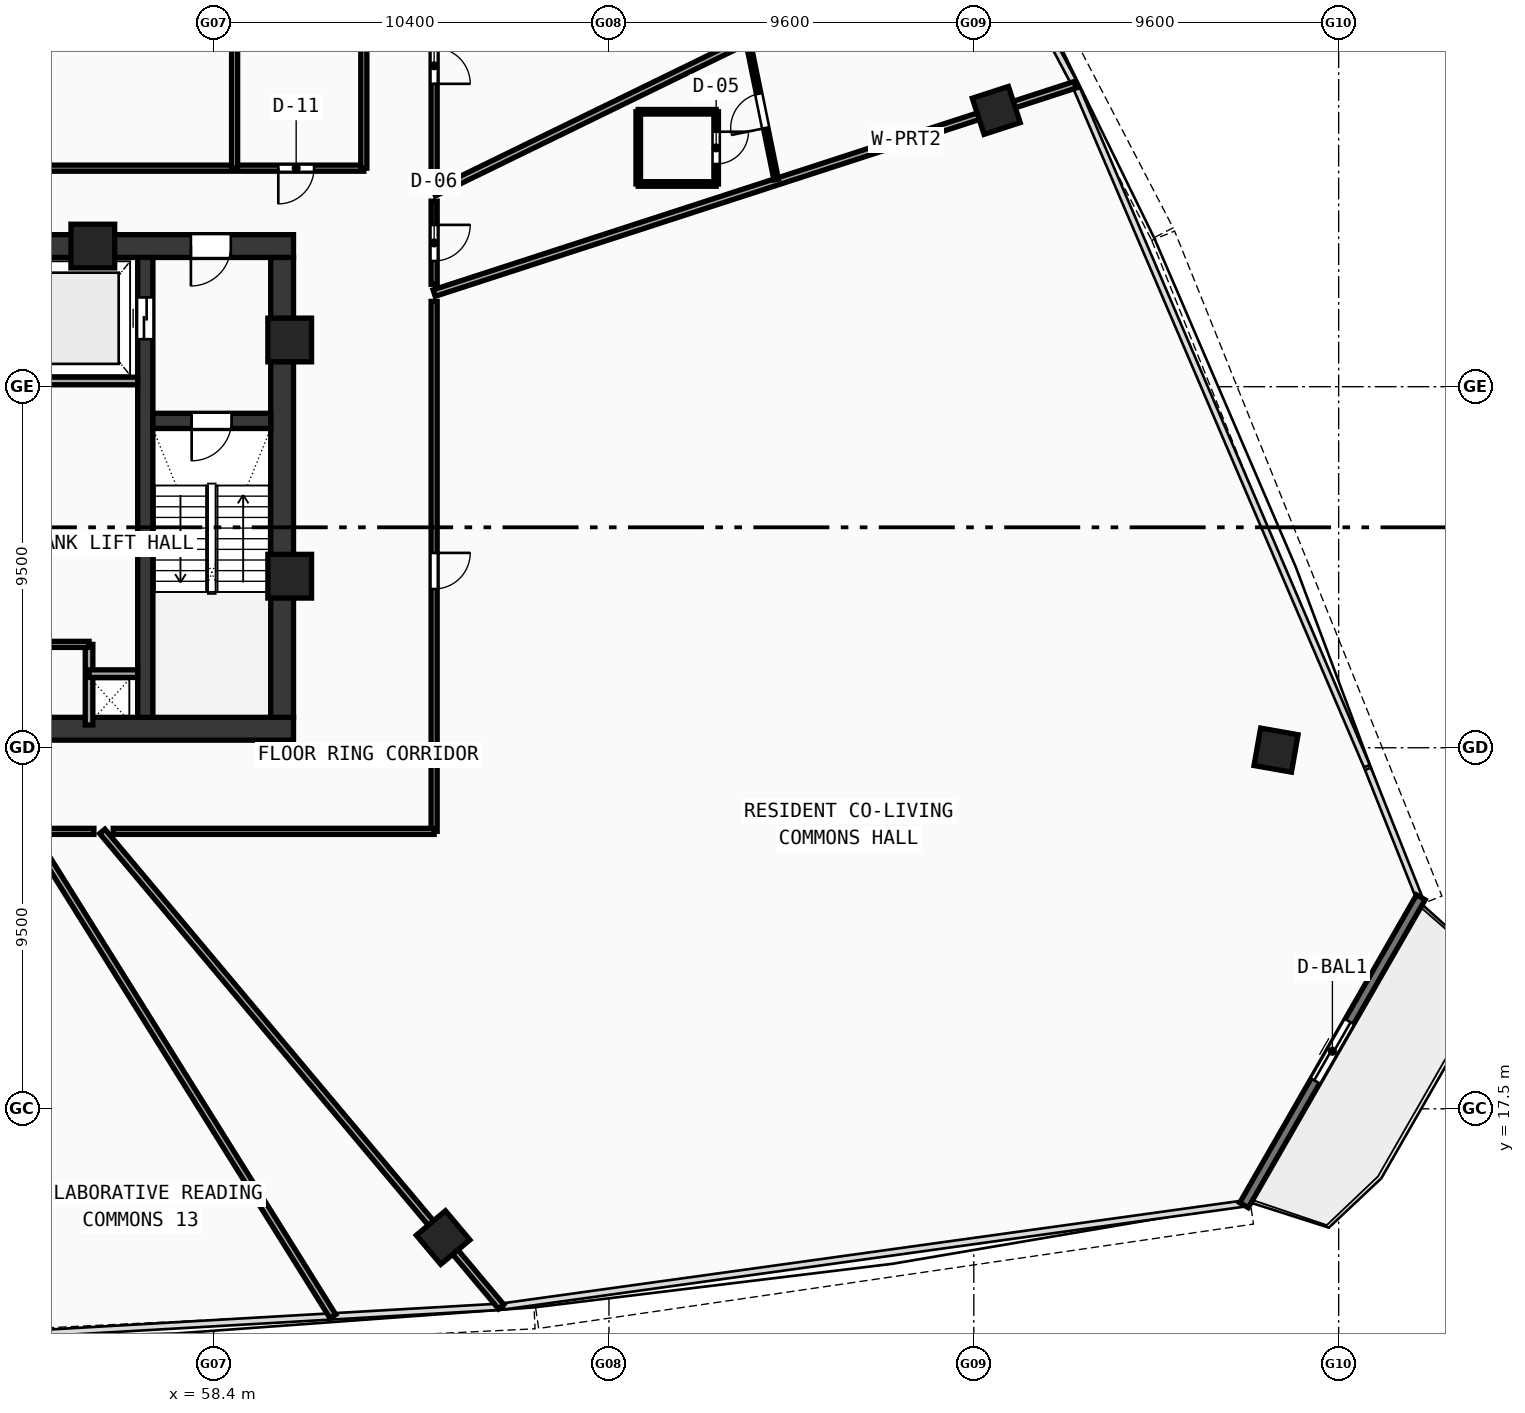
"""IFC4 building model, lengths in metres.
Left out: names, types, materials, properties, quantities, classifications, styles, units other than length and angle.
Written with IfcOpenShell. Run it as: python <this file> out.ifc"""

import sys

from ifc_helpers import new_model, si_unit, direction, frame, frame_2d, origin, origin_with_axes, origin_2d, place, context, subcontext, project, spatial, rectangle, hollow_rectangle, extrude, source, transform, mapped, element, fill, save


model = new_model("IFC4")
c1 = context("Model", 3, precision=1e-05, world=origin(), true_north=direction((0.0, 1.0)))
c2 = subcontext(c1, "Body", "Model", "MODEL_VIEW")
j1 = project(units=[si_unit("LENGTHUNIT", "METRE"), si_unit("PLANEANGLEUNIT", "RADIAN")], contexts=[c1])
p1 = place(None, origin())
s1 = spatial("IfcSite", under=j1, at=p1, CompositionType="ELEMENT")
p2 = place(p1, origin())
s2 = spatial("IfcBuilding", under=s1, at=p2, CompositionType="ELEMENT")
p3 = place(p2, frame((0.0, 0.0, 81.18)))
s3 = spatial("IfcBuildingStorey", under=s2, at=p3, CompositionType="ELEMENT", Elevation=81.18)
p4 = place(p3, frame((35.5, 27.5, 0.0), z_axis=(0.0, 0.0, 1.0), x_axis=(1.0, 0.0, 0.0)))
e1 = element("IfcWall", 1, at=p4, inside=s3, PredefinedType="SHEAR", context=c2, shape_type="SweptSolid", body=[
    extrude(rectangle(XDim=25.0, YDim=0.6, at=frame_2d((12.5, 0.0))), origin(), (0.0, 0.0, 1.0), 3.54),
])
p5 = place(p3, frame((49.2, 40.2, 0.0), z_axis=(0.0, 0.0, 1.0), x_axis=(1.0, 0.0, 0.0)))
e2 = element("IfcWall", 2, at=p5, inside=s3, PredefinedType="SHEAR", context=c2, shape_type="SweptSolid", body=[
    extrude(rectangle(XDim=11.3, YDim=0.6, at=frame_2d((5.65, 0.0))), origin(), (0.0, 0.0, 1.0), 3.54),
])
p6 = place(p5, frame((8.6, 0.0, 0.0)))
e3 = element("IfcOpeningElement", 3, at=p6, cuts=e2, PredefinedType="OPENING", context=c2, shape_type="SweptSolid", body=[
    extrude(rectangle(XDim=1.05, YDim=2.1, at=frame_2d((0.525, 1.05))), frame((0.0, 0.31, 0.0), z_axis=(0.0, -1.0, 0.0), x_axis=(1.0, 0.0, 0.0)), (0.0, 0.0, 1.0), 0.62),
])
p7 = place(p3, frame((60.2, 27.8, 0.0), z_axis=(0.0, 0.0, 1.0), x_axis=(0.0, 1.0, 0.0)))
e4 = element("IfcWall", 4, at=p7, inside=s3, PredefinedType="SHEAR", context=c2, shape_type="SweptSolid", body=[
    extrude(rectangle(XDim=12.1, YDim=0.6, at=frame_2d((6.05, 0.0))), origin(), (0.0, 0.0, 1.0), 3.54),
])
p8 = place(p3, frame((56.6, 27.8, 0.0), z_axis=(0.0, 0.0, 1.0), x_axis=(0.0, 1.0, 0.0)))
e5 = element("IfcWall", 5, at=p8, inside=s3, PredefinedType="SHEAR", context=c2, shape_type="SweptSolid", body=[
    extrude(rectangle(XDim=12.1, YDim=0.4, at=frame_2d((6.05, 0.0))), origin(), (0.0, 0.0, 1.0), 3.54),
])
p9 = place(p8, frame((9.95, 0.0, 0.0)))
e6 = element("IfcOpeningElement", 6, at=p9, cuts=e5, PredefinedType="OPENING", context=c2, shape_type="SweptSolid", body=[
    extrude(rectangle(XDim=1.1, YDim=2.1, at=frame_2d((0.55, 1.05))), frame((0.0, 0.21, 0.0), z_axis=(0.0, -1.0, 0.0), x_axis=(1.0, 0.0, 0.0)), (0.0, 0.0, 1.0), 0.42),
])
p10 = place(p3, frame((56.8, 35.6, 0.0), z_axis=(0.0, 0.0, 1.0), x_axis=(1.0, 0.0, 0.0)))
e7 = element("IfcWall", 7, at=p10, inside=s3, PredefinedType="SHEAR", context=c2, shape_type="SweptSolid", body=[
    extrude(rectangle(XDim=3.1, YDim=0.4, at=frame_2d((1.55, 0.0))), origin(), (0.0, 0.0, 1.0), 3.54),
])
p11 = place(p10, frame((1.02, 0.0, 0.0)))
e8 = element("IfcOpeningElement", 8, at=p11, cuts=e7, PredefinedType="OPENING", context=c2, shape_type="SweptSolid", body=[
    extrude(rectangle(XDim=1.05, YDim=2.1, at=frame_2d((0.525, 1.05))), frame((0.0, 0.21, 0.0), z_axis=(0.0, -1.0, 0.0), x_axis=(1.0, 0.0, 0.0)), (0.0, 0.0, 1.0), 0.42),
])
m1 = source(origin(), c2, "Body", "SweptSolid", [
    extrude(hollow_rectangle(XDim=1.15, YDim=1.15, WallThickness=0.048, at=origin_2d()), origin(), (0.0, 0.0, 1.0), 3.8),
])
for number, where, z_axis, x_axis in (
    (9, (60.4, 31.513, -0.26), (0.0, 0.0, 1.0), (1.0, 0.0, 0.0)),
    (10, (60.4, 37.729, -0.26), (0.0, 0.0, 1.0), (1.0, 0.0, 0.0)),
    (11, (55.219, 40.2, -0.26), (0.0, 0.0, 1.0), (1.0, 0.0, 0.0)),
):
    element("IfcColumn", number, at=place(p3, frame(where, z_axis=z_axis, x_axis=x_axis)), inside=s3, PredefinedType="COLUMN", context=c2, shape_type="MappedRepresentation", body=[
        mapped(m1, transform((0.0, 0.0, 0.0), scale=1.0)),
    ])
m2 = source(origin(), c2, "Body", "SweptSolid", [
    extrude(hollow_rectangle(XDim=1.0, YDim=1.0, WallThickness=0.042, at=origin_2d()), origin(), (0.0, 0.0, 1.0), 3.8),
])
for number, where, z_axis, x_axis in (
    (12, (64.436, 14.112, -0.26), (0.0, 0.0, 1.0), (0.766, 0.643, 0.0)),
    (13, (86.353, 26.938, -0.26), (0.0, 0.0, 1.0), (0.174, 0.985, 0.0)),
    (14, (78.991, 43.77, -0.26), (0.0, 0.0, 1.0), (-0.309, 0.951, 0.0)),
):
    element("IfcColumn", number, at=place(p3, frame(where, z_axis=z_axis, x_axis=x_axis)), inside=s3, PredefinedType="COLUMN", context=c2, shape_type="MappedRepresentation", body=[
        mapped(m2, transform((0.0, 0.0, 0.0), scale=1.0)),
    ])
p12 = place(p3, frame((85.51, 14.963, 0.0), z_axis=(0.0, 0.0, 1.0), x_axis=(0.497922114025, 0.867221752705, 0.0)))
e15 = element("IfcWall", 15, at=p12, inside=s3, PredefinedType="STANDARD", context=c2, shape_type="SweptSolid", body=[
    extrude(rectangle(XDim=9.343, YDim=0.26, at=frame_2d((4.671, 0.0))), origin(), (0.0, 0.0, 1.0), 3.54),
])
p13 = place(p12, frame((3.771, 0.0, 0.0)))
e16 = element("IfcOpeningElement", 16, at=p13, cuts=e15, PredefinedType="OPENING", context=c2, shape_type="SweptSolid", body=[
    extrude(rectangle(XDim=1.8, YDim=2.15, at=frame_2d((0.9, 1.075))), frame((0.0, 0.14, 0.0), z_axis=(0.0, -1.0, 0.0), x_axis=(1.0, 0.0, 0.0)), (0.0, 0.0, 1.0), 0.28),
])
p14 = place(p3, frame((53.68, 36.65, 0.0), z_axis=(0.0, 0.0, 1.0), x_axis=(1.0, 0.0, 0.0)))
e17 = element("IfcWall", 17, at=p14, inside=s3, PredefinedType="SOLIDWALL", context=c2, shape_type="SweptSolid", body=[
    extrude(rectangle(XDim=2.72, YDim=0.2, at=frame_2d((1.36, 0.0))), origin(), (0.0, 0.0, 1.0), 3.54),
])
p15 = place(p3, frame((55.12, 27.6, 0.0), z_axis=(0.0, 0.0, 1.0), x_axis=(0.0, 1.0, 0.0)))
e18 = element("IfcWall", 18, at=p15, inside=s3, PredefinedType="SOLIDWALL", context=c2, shape_type="SweptSolid", body=[
    extrude(rectangle(XDim=2.12, YDim=0.2, at=frame_2d((1.06, 0.0))), origin(), (0.0, 0.0, 1.0), 3.54),
])
p16 = place(p3, frame((55.12, 28.95, 0.0), z_axis=(0.0, 0.0, 1.0), x_axis=(1.0, 0.0, 0.0)))
e19 = element("IfcWall", 19, at=p16, inside=s3, PredefinedType="SOLIDWALL", context=c2, shape_type="SweptSolid", body=[
    extrude(rectangle(XDim=1.28, YDim=0.2, at=frame_2d((0.64, 0.0))), origin(), (0.0, 0.0, 1.0), 3.54),
])
p17 = place(p3, frame((51.05, 29.72, 0.0), z_axis=(0.0, 0.0, 1.0), x_axis=(1.0, 0.0, 0.0)))
e20 = element("IfcWall", 20, at=p17, inside=s3, PredefinedType="PARTITIONING", context=c2, shape_type="SweptSolid", body=[
    extrude(rectangle(XDim=4.07, YDim=0.16, at=frame_2d((2.035, 0.0))), origin(), (0.0, 0.0, 1.0), 3.54),
])
p18 = place(p17, frame((0.5, 0.0, 0.0)))
e21 = element("IfcOpeningElement", 21, at=p18, cuts=e20, PredefinedType="OPENING", context=c2, shape_type="SweptSolid", body=[
    extrude(rectangle(XDim=0.9, YDim=2.1, at=frame_2d((0.45, 1.05))), frame((0.0, 0.09, 0.0), z_axis=(0.0, -1.0, 0.0), x_axis=(1.0, 0.0, 0.0)), (0.0, 0.0, 1.0), 0.18),
])
p19 = place(p3, frame((45.92, 42.25, 0.0), z_axis=(0.0, 0.0, 1.0), x_axis=(1.0, 0.0, 0.0)))
e22 = element("IfcWall", 22, at=p19, inside=s3, PredefinedType="PARTITIONING", context=c2, shape_type="SweptSolid", body=[
    extrude(rectangle(XDim=16.43, YDim=0.16, at=frame_2d((8.215, 0.0))), origin(), (0.0, 0.0, 1.0), 2.84),
])
p20 = place(p19, frame((2.1, 0.0, 0.0)))
e23 = element("IfcOpeningElement", 23, at=p20, cuts=e22, PredefinedType="OPENING", context=c2, shape_type="SweptSolid", body=[
    extrude(rectangle(XDim=0.92, YDim=2.1, at=frame_2d((0.46, 1.05))), frame((0.0, 0.09, 0.0), z_axis=(0.0, -1.0, 0.0), x_axis=(1.0, 0.0, 0.0)), (0.0, 0.0, 1.0), 0.18),
])
p21 = place(p19, frame((14.18, 0.0, 0.0)))
e24 = element("IfcOpeningElement", 24, at=p21, cuts=e22, PredefinedType="OPENING", context=c2, shape_type="SweptSolid", body=[
    extrude(rectangle(XDim=0.94, YDim=2.1, at=frame_2d((0.47, 1.05))), frame((0.0, 0.09, 0.0), z_axis=(0.0, -1.0, 0.0), x_axis=(1.0, 0.0, 0.0)), (0.0, 0.0, 1.0), 0.18),
])
p22 = place(p3, frame((62.35, 42.25, 0.0), z_axis=(0.0, 0.0, 1.0), x_axis=(0.0, 1.0, 0.0)))
e25 = element("IfcWall", 25, at=p22, inside=s3, PredefinedType="PARTITIONING", context=c2, shape_type="SweptSolid", body=[
    extrude(rectangle(XDim=7.55, YDim=0.16, at=frame_2d((3.775, 0.0))), origin(), (0.0, 0.0, 1.0), 2.84),
])
p23 = place(p3, frame((58.95, 42.25, 0.0), z_axis=(0.0, 0.0, 1.0), x_axis=(0.0, 1.0, 0.0)))
e26 = element("IfcWall", 26, at=p23, inside=s3, PredefinedType="PARTITIONING", context=c2, shape_type="SweptSolid", body=[
    extrude(rectangle(XDim=4.35, YDim=0.16, at=frame_2d((2.175, 0.0))), origin(), (0.0, 0.0, 1.0), 2.84),
])
p24 = place(p3, frame((64.2, 38.964, 0.0), z_axis=(0.0, 0.0, 1.0), x_axis=(0.951054301474, 0.309023810812, 0.0)))
e27 = element("IfcWall", 27, at=p24, inside=s3, PredefinedType="PARTITIONING", context=c2, shape_type="SweptSolid", body=[
    extrude(rectangle(XDim=17.733, YDim=0.18, at=frame_2d((8.867, 0.0))), origin(), (0.0, 0.0, 1.0), 2.84),
])
p25 = place(p3, frame((64.2, 41.601, 0.0), z_axis=(0.0, 0.0, 1.0), x_axis=(0.898796049991, 0.438367038588, 0.0)))
e28 = element("IfcWall", 28, at=p25, inside=s3, PredefinedType="PARTITIONING", context=c2, shape_type="SweptSolid", body=[
    extrude(rectangle(XDim=16.234, YDim=0.18, at=frame_2d((8.117, 0.0))), origin(), (0.0, 0.0, 1.0), 2.84),
])
p26 = place(p3, frame((53.561, 24.8, 0.0), z_axis=(0.0, 0.0, 1.0), x_axis=(0.529927477017, -0.848042964184, 0.0)))
e29 = element("IfcWall", 29, at=p26, inside=s3, PredefinedType="PARTITIONING", context=c2, shape_type="SweptSolid", body=[
    extrude(rectangle(XDim=15.048, YDim=0.18, at=frame_2d((7.524, 0.0))), origin(), (0.0, 0.0, 1.0), 2.84),
])
p27 = place(p3, frame((55.468, 24.8, 0.0), z_axis=(0.0, 0.0, 1.0), x_axis=(0.642790086939, -0.76604236445, 0.0)))
e30 = element("IfcWall", 30, at=p27, inside=s3, PredefinedType="PARTITIONING", context=c2, shape_type="SweptSolid", body=[
    extrude(rectangle(XDim=16.326, YDim=0.18, at=frame_2d((8.163, 0.0))), origin(), (0.0, 0.0, 1.0), 2.84),
])
p28 = place(p3, frame((64.2, 48.067, 0.0), z_axis=(0.0, 0.0, 1.0), x_axis=(0.0, -1.0, 0.0)))
e31 = element("IfcWall", 31, at=p28, inside=s3, PredefinedType="PARTITIONING", context=c2, shape_type="SweptSolid", body=[
    extrude(rectangle(XDim=6.221, YDim=0.16, at=frame_2d((3.11, 0.0))), origin(), (0.0, 0.0, 1.0), 2.84),
])
p29 = place(p28, frame((2.648, 0.0, 0.0)))
e32 = element("IfcOpeningElement", 32, at=p29, cuts=e31, PredefinedType="OPENING", context=c2, shape_type="SweptSolid", body=[
    extrude(rectangle(XDim=0.95, YDim=2.1, at=frame_2d((0.475, 1.05))), frame((0.0, 0.09, 0.0), z_axis=(0.0, -1.0, 0.0), x_axis=(1.0, 0.0, 0.0)), (0.0, 0.0, 1.0), 0.18),
])
p30 = place(p3, frame((64.2, 41.382, 0.0), z_axis=(0.0, 0.0, 1.0), x_axis=(0.0, -1.0, 0.0)))
e33 = element("IfcWall", 33, at=p30, inside=s3, PredefinedType="PARTITIONING", context=c2, shape_type="SweptSolid", body=[
    extrude(rectangle(XDim=2.187, YDim=0.16, at=frame_2d((1.093, 0.0))), origin(), (0.0, 0.0, 1.0), 3.54),
])
p31 = place(p30, frame((0.624, 0.0, 0.0)))
e34 = element("IfcOpeningElement", 34, at=p31, cuts=e33, PredefinedType="OPENING", context=c2, shape_type="SweptSolid", body=[
    extrude(rectangle(XDim=0.95, YDim=2.1, at=frame_2d((0.475, 1.05))), frame((0.0, 0.09, 0.0), z_axis=(0.0, -1.0, 0.0), x_axis=(1.0, 0.0, 0.0)), (0.0, 0.0, 1.0), 0.18),
])
p32 = place(p3, frame((64.2, 38.744, 0.0), z_axis=(0.0, 0.0, 1.0), x_axis=(0.0, -1.0, 0.0)))
e35 = element("IfcWall", 35, at=p32, inside=s3, PredefinedType="PARTITIONING", context=c2, shape_type="SweptSolid", body=[
    extrude(rectangle(XDim=13.944, YDim=0.16, at=frame_2d((6.972, 0.0))), origin(), (0.0, 0.0, 1.0), 2.84),
])
p33 = place(p32, frame((6.617, 0.0, 0.0)))
e36 = element("IfcOpeningElement", 36, at=p33, cuts=e35, PredefinedType="OPENING", context=c2, shape_type="SweptSolid", body=[
    extrude(rectangle(XDim=0.95, YDim=2.1, at=frame_2d((0.475, 1.05))), frame((0.0, 0.09, 0.0), z_axis=(0.0, -1.0, 0.0), x_axis=(1.0, 0.0, 0.0)), (0.0, 0.0, 1.0), 0.18),
])
p34 = place(p3, frame((64.2, 24.8, 0.0), z_axis=(0.0, 0.0, 1.0), x_axis=(-1.0, 0.0, 0.0)))
e37 = element("IfcWall", 37, at=p34, inside=s3, PredefinedType="PARTITIONING", context=c2, shape_type="SweptSolid", body=[
    extrude(rectangle(XDim=8.445, YDim=0.16, at=frame_2d((4.222, 0.0))), origin(), (0.0, 0.0, 1.0), 3.14),
])
p35 = place(p3, frame((55.248, 24.8, 0.0), z_axis=(0.0, 0.0, 1.0), x_axis=(-1.0, 0.0, 0.0)))
e38 = element("IfcWall", 38, at=p35, inside=s3, PredefinedType="PARTITIONING", context=c2, shape_type="SweptSolid", body=[
    extrude(rectangle(XDim=1.427, YDim=0.16, at=frame_2d((0.714, 0.0))), origin(), (0.0, 0.0, 1.0), 2.84),
])
p36 = place(p3, frame((69.571, 41.834, 0.0), z_axis=(0.0, 0.0, 1.0), x_axis=(1.0, 0.0, 0.0)))
e39 = element("IfcWall", 39, at=p36, inside=s3, PredefinedType="PARTITIONING", context=c2, shape_type="SweptSolid", body=[
    extrude(rectangle(XDim=2.05, YDim=0.12, at=frame_2d((1.025, 0.0))), origin(), (0.0, 0.0, 1.0), 3.54),
])
p37 = place(p3, frame((71.621, 41.834, 0.0), z_axis=(0.0, 0.0, 1.0), x_axis=(0.0, 1.0, 0.0)))
e40 = element("IfcWall", 40, at=p37, inside=s3, PredefinedType="PARTITIONING", context=c2, shape_type="SweptSolid", body=[
    extrude(rectangle(XDim=1.9, YDim=0.12, at=frame_2d((0.95, 0.0))), origin(), (0.0, 0.0, 1.0), 3.14),
])
p38 = place(p37, frame((0.525, 0.0, 0.0)))
e41 = element("IfcOpeningElement", 41, at=p38, cuts=e40, PredefinedType="OPENING", context=c2, shape_type="SweptSolid", body=[
    extrude(rectangle(XDim=0.85, YDim=2.1, at=frame_2d((0.425, 1.05))), frame((0.0, 0.07, 0.0), z_axis=(0.0, -1.0, 0.0), x_axis=(1.0, 0.0, 0.0)), (0.0, 0.0, 1.0), 0.14),
])
p39 = place(p3, frame((71.621, 43.734, 0.0), z_axis=(0.0, 0.0, 1.0), x_axis=(-1.0, 0.0, 0.0)))
e42 = element("IfcWall", 42, at=p39, inside=s3, PredefinedType="PARTITIONING", context=c2, shape_type="SweptSolid", body=[
    extrude(rectangle(XDim=2.05, YDim=0.12, at=frame_2d((1.025, 0.0))), origin(), (0.0, 0.0, 1.0), 3.54),
])
p40 = place(p3, frame((69.571, 43.734, 0.0), z_axis=(0.0, 0.0, 1.0), x_axis=(0.0, -1.0, 0.0)))
e43 = element("IfcWall", 43, at=p40, inside=s3, PredefinedType="PARTITIONING", context=c2, shape_type="SweptSolid", body=[
    extrude(rectangle(XDim=1.9, YDim=0.12, at=frame_2d((0.95, 0.0))), origin(), (0.0, 0.0, 1.0), 3.54),
])
p41 = place(p3, frame((73.2, 41.951, 0.0), z_axis=(0.0, 0.0, 1.0), x_axis=(-0.199717476268, 0.979853524601, 0.0)))
e44 = element("IfcWall", 44, at=p41, inside=s3, PredefinedType="PARTITIONING", context=c2, shape_type="SweptSolid", body=[
    extrude(rectangle(XDim=3.688, YDim=0.12, at=frame_2d((1.844, 0.0))), origin(), (0.0, 0.0, 1.0), 2.84),
])
p42 = place(p41, frame((1.384, 0.0, 0.0)))
e45 = element("IfcOpeningElement", 45, at=p42, cuts=e44, PredefinedType="OPENING", context=c2, shape_type="SweptSolid", body=[
    extrude(rectangle(XDim=0.92, YDim=2.1, at=frame_2d((0.46, 1.05))), frame((0.0, 0.07, 0.0), z_axis=(0.0, -1.0, 0.0), x_axis=(1.0, 0.0, 0.0)), (0.0, 0.0, 1.0), 0.14),
])
m3 = source(origin(), c2, "Body", "SweptSolid", [
    extrude(rectangle(XDim=1.8, YDim=2.15, at=frame_2d((0.9, 1.075))), frame((0.0, 0.025, 0.0), z_axis=(0.0, -1.0, 0.0), x_axis=(1.0, 0.0, 0.0)), (0.0, 0.0, 1.0), 0.05),
])
p43 = place(p13, origin_with_axes())
e46 = element("IfcDoor", 46, at=p43, inside=s3, OperationType="DOUBLE_DOOR_SLIDING", PredefinedType="DOOR", context=c2, shape_type="MappedRepresentation", body=[
    mapped(m3, transform((0.0, 0.0, 0.0), scale=1.0)),
])
fill(e16, e46)
m4 = source(origin(), c2, "Body", "SweptSolid", [
    extrude(rectangle(XDim=1.05, YDim=2.1, at=frame_2d((0.525, 1.05))), frame((0.0, 0.025, 0.0), z_axis=(0.0, -1.0, 0.0), x_axis=(1.0, 0.0, 0.0)), (0.0, 0.0, 1.0), 0.05),
])
p44 = place(p11, frame((1.05, 0.0, 0.0), z_axis=(0.0, 0.0, 1.0), x_axis=(-1.0, 0.0, 0.0)))
e47 = element("IfcDoor", 47, at=p44, inside=s3, OperationType="SINGLE_SWING_RIGHT", PredefinedType="DOOR", context=c2, shape_type="MappedRepresentation", body=[
    mapped(m4, transform((0.0, 0.0, 0.0), scale=1.0)),
])
fill(e8, e47)
p45 = place(p6, frame((1.05, 0.0, 0.0), z_axis=(0.0, 0.0, 1.0), x_axis=(-1.0, 0.0, 0.0)))
e48 = element("IfcDoor", 48, at=p45, inside=s3, OperationType="SINGLE_SWING_RIGHT", PredefinedType="DOOR", context=c2, shape_type="MappedRepresentation", body=[
    mapped(m4, transform((0.0, 0.0, 0.0), scale=1.0)),
])
fill(e3, e48)
m5 = source(origin(), c2, "Body", "SweptSolid", [
    extrude(rectangle(XDim=1.1, YDim=2.1, at=frame_2d((0.55, 1.05))), frame((0.0, 0.025, 0.0), z_axis=(0.0, -1.0, 0.0), x_axis=(1.0, 0.0, 0.0)), (0.0, 0.0, 1.0), 0.05),
])
p46 = place(p9, origin_with_axes())
e49 = element("IfcDoor", 49, at=p46, inside=s3, OperationType="DOUBLE_DOOR_SLIDING", PredefinedType="DOOR", context=c2, shape_type="MappedRepresentation", body=[
    mapped(m5, transform((0.0, 0.0, 0.0), scale=1.0)),
])
fill(e6, e49)
m6 = source(origin(), c2, "Body", "SweptSolid", [
    extrude(rectangle(XDim=0.94, YDim=2.1, at=frame_2d((0.47, 1.05))), frame((0.0, 0.025, 0.0), z_axis=(0.0, -1.0, 0.0), x_axis=(1.0, 0.0, 0.0)), (0.0, 0.0, 1.0), 0.05),
])
p47 = place(p21, frame((0.94, 0.0, 0.0), z_axis=(0.0, 0.0, 1.0), x_axis=(-1.0, 0.0, 0.0)))
e50 = element("IfcDoor", 50, at=p47, inside=s3, OperationType="SINGLE_SWING_RIGHT", PredefinedType="DOOR", context=c2, shape_type="MappedRepresentation", body=[
    mapped(m6, transform((0.0, 0.0, 0.0), scale=1.0)),
])
fill(e24, e50)
m7 = source(origin(), c2, "Body", "SweptSolid", [
    extrude(rectangle(XDim=0.95, YDim=2.1, at=frame_2d((0.475, 1.05))), frame((0.0, 0.025, 0.0), z_axis=(0.0, -1.0, 0.0), x_axis=(1.0, 0.0, 0.0)), (0.0, 0.0, 1.0), 0.05),
])
p48 = place(p31, origin_with_axes())
e51 = element("IfcDoor", 51, at=p48, inside=s3, OperationType="SINGLE_SWING_LEFT", PredefinedType="DOOR", context=c2, shape_type="MappedRepresentation", body=[
    mapped(m7, transform((0.0, 0.0, 0.0), scale=1.0)),
])
fill(e34, e51)
m8 = source(origin(), c2, "Body", "SweptSolid", [
    extrude(rectangle(XDim=0.85, YDim=2.1, at=frame_2d((0.425, 1.05))), frame((0.0, 0.025, 0.0), z_axis=(0.0, -1.0, 0.0), x_axis=(1.0, 0.0, 0.0)), (0.0, 0.0, 1.0), 0.05),
])
p49 = place(p38, frame((0.85, 0.0, 0.0), z_axis=(0.0, 0.0, 1.0), x_axis=(-1.0, 0.0, 0.0)))
e52 = element("IfcDoor", 52, at=p49, inside=s3, OperationType="SINGLE_SWING_LEFT", PredefinedType="DOOR", context=c2, shape_type="MappedRepresentation", body=[
    mapped(m8, transform((0.0, 0.0, 0.0), scale=1.0)),
])
fill(e41, e52)
m9 = source(origin(), c2, "Body", "SweptSolid", [
    extrude(rectangle(XDim=0.92, YDim=2.1, at=frame_2d((0.46, 1.05))), frame((0.0, 0.025, 0.0), z_axis=(0.0, -1.0, 0.0), x_axis=(1.0, 0.0, 0.0)), (0.0, 0.0, 1.0), 0.05),
])
p50 = place(p42, origin_with_axes())
e53 = element("IfcDoor", 53, at=p50, inside=s3, OperationType="SINGLE_SWING_LEFT", PredefinedType="DOOR", context=c2, shape_type="MappedRepresentation", body=[
    mapped(m9, transform((0.0, 0.0, 0.0), scale=1.0)),
])
fill(e45, e53)
p51 = place(p29, origin_with_axes())
e54 = element("IfcDoor", 54, at=p51, inside=s3, OperationType="SINGLE_SWING_RIGHT", PredefinedType="DOOR", context=c2, shape_type="MappedRepresentation", body=[
    mapped(m7, transform((0.0, 0.0, 0.0), scale=1.0)),
])
fill(e32, e54)
p52 = place(p33, origin_with_axes())
e55 = element("IfcDoor", 55, at=p52, inside=s3, OperationType="SINGLE_SWING_LEFT", PredefinedType="DOOR", context=c2, shape_type="MappedRepresentation", body=[
    mapped(m7, transform((0.0, 0.0, 0.0), scale=1.0)),
])
fill(e36, e55)
save(model, sys.argv[1])
